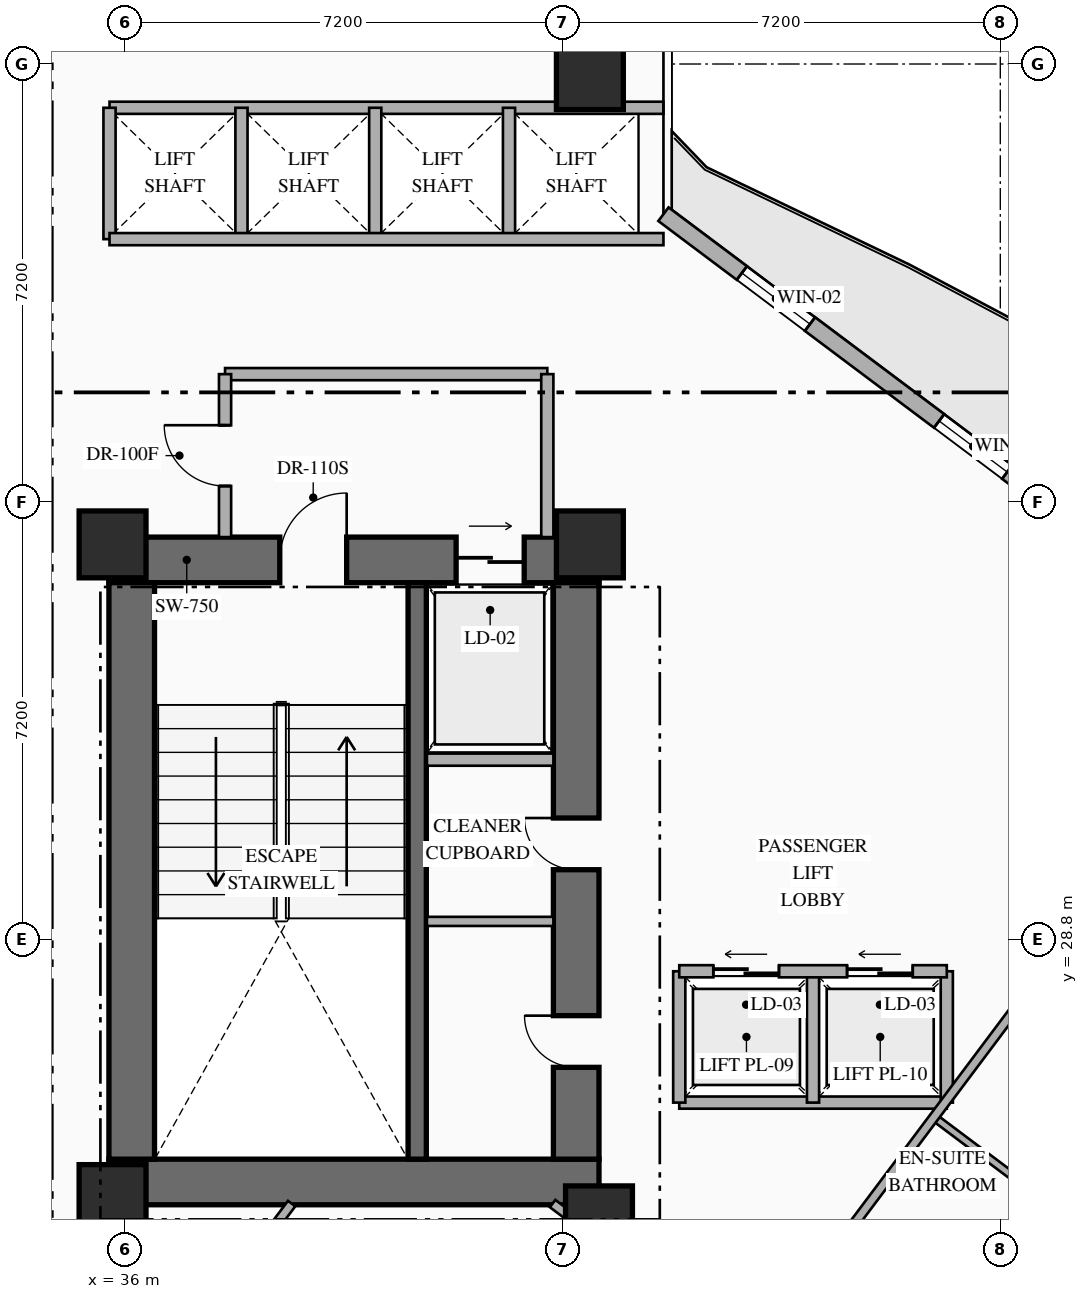
"""IFC4 building model, lengths in metres.
Left out: names, types, materials, properties, quantities, classifications, styles, units other than length and angle.
Written with IfcOpenShell. Run it as: python <this file> out.ifc"""

import sys

from ifc_helpers import new_model, si_unit, direction, frame, frame_2d, origin, origin_2d, place, context, subcontext, project, spatial, rectangle, extrude, element, fill, save


model = new_model("IFC4")
c1 = context("Model", 3, precision=1e-05, world=origin(), true_north=direction((0.0, 1.0)))
c2 = subcontext(c1, "Body", "Model", "MODEL_VIEW")
j1 = project(units=[si_unit("LENGTHUNIT", "METRE"), si_unit("PLANEANGLEUNIT", "RADIAN")], contexts=[c1])
p1 = place(None, origin())
s1 = spatial("IfcSite", under=j1, at=p1, CompositionType="ELEMENT")
p2 = place(p1, origin())
s2 = spatial("IfcBuilding", under=s1, at=p2, CompositionType="ELEMENT")
p3 = place(p2, frame((0.0, 0.0, 43.3)))
s3 = spatial("IfcBuildingStorey", under=s2, at=p3, CompositionType="ELEMENT", Elevation=43.3)
p4 = place(p3, frame((35.74, 24.815, 0.0), z_axis=(0.0, 0.0, 1.0), x_axis=(1.0, 0.0, 0.0)))
e1 = element("IfcWall", 1, at=p4, inside=s3, PredefinedType="SHEAR", context=c2, shape_type="SweptSolid", body=[
    extrude(rectangle(XDim=8.06, YDim=0.75, at=frame_2d((4.03, 0.0))), origin(), (0.0, 0.0, 1.0), 3.35),
])
p5 = place(p3, frame((35.74, 35.045, 0.0), z_axis=(0.0, 0.0, 1.0), x_axis=(1.0, 0.0, 0.0)))
e2 = element("IfcWall", 2, at=p5, inside=s3, PredefinedType="SHEAR", context=c2, shape_type="SweptSolid", body=[
    extrude(rectangle(XDim=8.06, YDim=0.75, at=frame_2d((4.03, 0.0))), origin(), (0.0, 0.0, 1.0), 3.35),
])
p6 = place(p5, frame((2.81, 0.0, 0.0)))
e3 = element("IfcOpeningElement", 3, at=p6, cuts=e2, PredefinedType="OPENING", context=c2, shape_type="SweptSolid", body=[
    extrude(rectangle(XDim=1.1, YDim=2.2, at=frame_2d((0.55, 1.1))), frame((0.0, 0.385, 0.0), z_axis=(0.0, -1.0, 0.0), x_axis=(1.0, 0.0, 0.0)), (0.0, 0.0, 1.0), 0.77),
])
p7 = place(p5, frame((5.71, 0.0, 0.0)))
e4 = element("IfcOpeningElement", 4, at=p7, cuts=e2, PredefinedType="OPENING", context=c2, shape_type="SweptSolid", body=[
    extrude(rectangle(XDim=1.12, YDim=2.15, at=frame_2d((0.56, 1.075))), frame((0.0, 0.385, 0.0), z_axis=(0.0, -1.0, 0.0), x_axis=(1.0, 0.0, 0.0)), (0.0, 0.0, 1.0), 0.77),
])
p8 = place(p3, frame((36.115, 25.19, 0.0), z_axis=(0.0, 0.0, 1.0), x_axis=(0.0, 1.0, 0.0)))
e5 = element("IfcWall", 5, at=p8, inside=s3, PredefinedType="SHEAR", context=c2, shape_type="SweptSolid", body=[
    extrude(rectangle(XDim=9.48, YDim=0.75, at=frame_2d((4.74, 0.0))), origin(), (0.0, 0.0, 1.0), 3.35),
])
p9 = place(p3, frame((43.425, 25.19, 0.0), z_axis=(0.0, 0.0, 1.0), x_axis=(0.0, 1.0, 0.0)))
e6 = element("IfcWall", 6, at=p9, inside=s3, PredefinedType="SHEAR", context=c2, shape_type="SweptSolid", body=[
    extrude(rectangle(XDim=9.48, YDim=0.75, at=frame_2d((4.74, 0.0))), origin(), (0.0, 0.0, 1.0), 3.35),
])
p10 = place(p9, frame((1.51, 0.0, 0.0)))
e7 = element("IfcOpeningElement", 7, at=p10, cuts=e6, PredefinedType="OPENING", context=c2, shape_type="SweptSolid", body=[
    extrude(rectangle(XDim=0.85, YDim=2.08, at=frame_2d((0.425, 1.04))), frame((0.0, 0.385, 0.0), z_axis=(0.0, -1.0, 0.0), x_axis=(1.0, 0.0, 0.0)), (0.0, 0.0, 1.0), 0.77),
])
p11 = place(p9, frame((4.76, 0.0, 0.0)))
e8 = element("IfcOpeningElement", 8, at=p11, cuts=e6, PredefinedType="OPENING", context=c2, shape_type="SweptSolid", body=[
    extrude(rectangle(XDim=0.85, YDim=2.08, at=frame_2d((0.425, 1.04))), frame((0.0, 0.385, 0.0), z_axis=(0.0, -1.0, 0.0), x_axis=(1.0, 0.0, 0.0)), (0.0, 0.0, 1.0), 0.77),
])
p12 = place(p3, frame((40.81, 25.19, 0.0), z_axis=(0.0, 0.0, 1.0), x_axis=(0.0, 1.0, 0.0)))
e9 = element("IfcWall", 9, at=p12, inside=s3, PredefinedType="SHEAR", context=c2, shape_type="SweptSolid", body=[
    extrude(rectangle(XDim=9.48, YDim=0.3, at=frame_2d((4.74, 0.0))), origin(), (0.0, 0.0, 1.0), 3.35),
])
for number, where, z_axis, x_axis in (
    (10, (35.8, 24.55, 0.0), (0.0, 0.0, 1.0), (1.0, 0.0, 0.0)),
    (11, (43.8, 24.2, 0.0), (0.0, 0.0, 1.0), (1.0, 0.0, 0.0)),
    (12, (35.8, 35.3, 0.0), (0.0, 0.0, 1.0), (1.0, 0.0, 0.0)),
    (13, (43.65, 35.3, 0.0), (0.0, 0.0, 1.0), (1.0, 0.0, 0.0)),
    (14, (43.65, 43.0, 0.0), (0.0, 0.0, 1.0), (1.0, 0.0, 0.0)),
):
    element("IfcColumn", number, at=place(p3, frame(where, z_axis=z_axis, x_axis=x_axis)), inside=s3, PredefinedType="COLUMN", context=c2, shape_type="SweptSolid", body=[
        extrude(rectangle(XDim=1.1, YDim=1.1, at=origin_2d()), origin(), (0.0, 0.0, 1.0), 3.35),
    ])
p13 = place(p3, frame((44.86, 40.73, 0.0), z_axis=(0.0, 0.0, 1.0), x_axis=(0.800006902154, -0.599990797017, 0.0)))
e15 = element("IfcWall", 15, at=p13, inside=s3, PredefinedType="STANDARD", context=c2, shape_type="SweptSolid", body=[
    extrude(rectangle(XDim=29.712, YDim=0.28, at=frame_2d((14.856, 0.0))), origin(), (0.0, 0.0, 1.0), 3.13),
])
p14 = place(p13, frame((14.249, 0.0, 0.0)))
e16 = element("IfcOpeningElement", 16, at=p14, cuts=e15, PredefinedType="OPENING", context=c2, shape_type="SweptSolid", body=[
    extrude(rectangle(XDim=1.1, YDim=2.2, at=frame_2d((0.55, 1.1))), frame((0.0, 0.15, 0.0), z_axis=(0.0, -1.0, 0.0), x_axis=(1.0, 0.0, 0.0)), (0.0, 0.0, 1.0), 0.3),
])
p15 = place(p13, frame((1.612, 0.0, 0.85)))
e17 = element("IfcOpeningElement", 17, at=p15, cuts=e15, PredefinedType="OPENING", context=c2, shape_type="SweptSolid", body=[
    extrude(rectangle(XDim=1.4, YDim=1.8, at=frame_2d((0.7, 0.9))), frame((0.0, 0.15, 0.0), z_axis=(0.0, -1.0, 0.0), x_axis=(1.0, 0.0, 0.0)), (0.0, 0.0, 1.0), 0.3),
])
p16 = place(p13, frame((5.667, 0.0, 0.85)))
e18 = element("IfcOpeningElement", 18, at=p16, cuts=e15, PredefinedType="OPENING", context=c2, shape_type="SweptSolid", body=[
    extrude(rectangle(XDim=1.4, YDim=1.8, at=frame_2d((0.7, 0.9))), frame((0.0, 0.15, 0.0), z_axis=(0.0, -1.0, 0.0), x_axis=(1.0, 0.0, 0.0)), (0.0, 0.0, 1.0), 0.3),
])
p17 = place(p13, frame((9.912, 0.0, 0.85)))
e19 = element("IfcOpeningElement", 19, at=p17, cuts=e15, PredefinedType="OPENING", context=c2, shape_type="SweptSolid", body=[
    extrude(rectangle(XDim=1.4, YDim=1.8, at=frame_2d((0.7, 0.9))), frame((0.0, 0.15, 0.0), z_axis=(0.0, -1.0, 0.0), x_axis=(1.0, 0.0, 0.0)), (0.0, 0.0, 1.0), 0.3),
])
p18 = place(p13, frame((19.528, 0.0, 0.85)))
e20 = element("IfcOpeningElement", 20, at=p18, cuts=e15, PredefinedType="OPENING", context=c2, shape_type="SweptSolid", body=[
    extrude(rectangle(XDim=1.4, YDim=1.8, at=frame_2d((0.7, 0.9))), frame((0.0, 0.15, 0.0), z_axis=(0.0, -1.0, 0.0), x_axis=(1.0, 0.0, 0.0)), (0.0, 0.0, 1.0), 0.3),
])
p19 = place(p13, frame((23.451, 0.0, 0.85)))
e21 = element("IfcOpeningElement", 21, at=p19, cuts=e15, PredefinedType="OPENING", context=c2, shape_type="SweptSolid", body=[
    extrude(rectangle(XDim=1.4, YDim=1.8, at=frame_2d((0.7, 0.9))), frame((0.0, 0.15, 0.0), z_axis=(0.0, -1.0, 0.0), x_axis=(1.0, 0.0, 0.0)), (0.0, 0.0, 1.0), 0.3),
])
p20 = place(p13, frame((27.852, 0.0, 0.85)))
e22 = element("IfcOpeningElement", 22, at=p20, cuts=e15, PredefinedType="OPENING", context=c2, shape_type="SweptSolid", body=[
    extrude(rectangle(XDim=1.4, YDim=1.8, at=frame_2d((0.7, 0.9))), frame((0.0, 0.15, 0.0), z_axis=(0.0, -1.0, 0.0), x_axis=(1.0, 0.0, 0.0)), (0.0, 0.0, 1.0), 0.3),
])
p21 = place(p3, frame((40.97, 31.76, 0.0), z_axis=(0.0, 0.0, 1.0), x_axis=(1.0, 0.0, 0.0)))
e23 = element("IfcWall", 23, at=p21, inside=s3, PredefinedType="STANDARD", context=c2, shape_type="SweptSolid", body=[
    extrude(rectangle(XDim=2.08, YDim=0.2, at=frame_2d((1.04, 0.0))), origin(), (0.0, 0.0, 1.0), 3.13),
])
p22 = place(p3, frame((40.97, 29.1, 0.0), z_axis=(0.0, 0.0, 1.0), x_axis=(1.0, 0.0, 0.0)))
e24 = element("IfcWall", 24, at=p22, inside=s3, PredefinedType="PARTITIONING", context=c2, shape_type="SweptSolid", body=[
    extrude(rectangle(XDim=2.08, YDim=0.15, at=frame_2d((1.04, 0.0))), origin(), (0.0, 0.0, 1.0), 3.13),
])
p23 = place(p3, frame((37.65, 38.1, 0.0), z_axis=(0.0, 0.0, 1.0), x_axis=(1.0, 0.0, 0.0)))
e25 = element("IfcWall", 25, at=p23, inside=s3, PredefinedType="STANDARD", context=c2, shape_type="SweptSolid", body=[
    extrude(rectangle(XDim=5.3, YDim=0.2, at=frame_2d((2.65, 0.0))), origin(), (0.0, 0.0, 1.0), 3.13),
])
p24 = place(p3, frame((42.95, 35.42, 0.0), z_axis=(0.0, 0.0, 1.0), x_axis=(0.0, 1.0, 0.0)))
e26 = element("IfcWall", 26, at=p24, inside=s3, PredefinedType="STANDARD", context=c2, shape_type="SweptSolid", body=[
    extrude(rectangle(XDim=2.68, YDim=0.2, at=frame_2d((1.34, 0.0))), origin(), (0.0, 0.0, 1.0), 3.13),
])
p25 = place(p3, frame((37.65, 35.42, 0.0), z_axis=(0.0, 0.0, 1.0), x_axis=(0.0, 1.0, 0.0)))
e27 = element("IfcWall", 27, at=p25, inside=s3, PredefinedType="STANDARD", context=c2, shape_type="SweptSolid", body=[
    extrude(rectangle(XDim=2.68, YDim=0.2, at=frame_2d((1.34, 0.0))), origin(), (0.0, 0.0, 1.0), 3.13),
])
p26 = place(p25, frame((0.84, 0.0, 0.0)))
e28 = element("IfcOpeningElement", 28, at=p26, cuts=e27, PredefinedType="OPENING", context=c2, shape_type="SweptSolid", body=[
    extrude(rectangle(XDim=1.0, YDim=2.2, at=frame_2d((0.5, 1.1))), frame((0.0, 0.11, 0.0), z_axis=(0.0, -1.0, 0.0), x_axis=(1.0, 0.0, 0.0)), (0.0, 0.0, 1.0), 0.22),
])
p27 = place(p3, frame((35.75, 42.48, 0.0), z_axis=(0.0, 0.0, 1.0), x_axis=(1.0, 0.0, 0.0)))
e29 = element("IfcWall", 29, at=p27, inside=s3, PredefinedType="STANDARD", context=c2, shape_type="SweptSolid", body=[
    extrude(rectangle(XDim=9.11, YDim=0.2, at=frame_2d((4.555, 0.0))), origin(), (0.0, 0.0, 1.0), 3.13),
])
for number, where, z_axis, x_axis in (
    (30, (35.75, 40.32, 0.0), (0.0, 0.0, 1.0), (0.0, 1.0, 0.0)),
    (31, (37.92, 40.32, 0.0), (0.0, 0.0, 1.0), (0.0, 1.0, 0.0)),
    (32, (40.12, 40.32, 0.0), (0.0, 0.0, 1.0), (0.0, 1.0, 0.0)),
    (33, (42.32, 40.32, 0.0), (0.0, 0.0, 1.0), (0.0, 1.0, 0.0)),
):
    element("IfcWall", number, at=place(p3, frame(where, z_axis=z_axis, x_axis=x_axis)), inside=s3, PredefinedType="STANDARD", context=c2, shape_type="SweptSolid", body=[
        extrude(rectangle(XDim=2.16, YDim=0.2, at=frame_2d((1.08, 0.0))), origin(), (0.0, 0.0, 1.0), 3.13),
    ])
p28 = place(p3, frame((35.75, 40.32, 0.0), z_axis=(0.0, 0.0, 1.0), x_axis=(1.0, 0.0, 0.0)))
e34 = element("IfcWall", 34, at=p28, inside=s3, PredefinedType="STANDARD", context=c2, shape_type="SweptSolid", body=[
    extrude(rectangle(XDim=9.11, YDim=0.2, at=frame_2d((4.555, 0.0))), origin(), (0.0, 0.0, 1.0), 3.13),
])
p29 = place(p3, frame((45.12, 26.12, 0.0), z_axis=(0.0, 0.0, 1.0), x_axis=(1.0, 0.0, 0.0)))
e35 = element("IfcWall", 35, at=p29, inside=s3, PredefinedType="STANDARD", context=c2, shape_type="SweptSolid", body=[
    extrude(rectangle(XDim=4.4, YDim=0.2, at=frame_2d((2.2, 0.0))), origin(), (0.0, 0.0, 1.0), 3.13),
])
for number, where, z_axis, x_axis in (
    (36, (45.12, 26.12, 0.0), (0.0, 0.0, 1.0), (0.0, 1.0, 0.0)),
    (37, (49.52, 26.12, 0.0), (0.0, 0.0, 1.0), (0.0, 1.0, 0.0)),
    (38, (47.32, 26.12, 0.0), (0.0, 0.0, 1.0), (0.0, 1.0, 0.0)),
):
    element("IfcWall", number, at=place(p3, frame(where, z_axis=z_axis, x_axis=x_axis)), inside=s3, PredefinedType="STANDARD", context=c2, shape_type="SweptSolid", body=[
        extrude(rectangle(XDim=2.16, YDim=0.2, at=frame_2d((1.08, 0.0))), origin(), (0.0, 0.0, 1.0), 3.13),
    ])
p30 = place(p3, frame((45.12, 28.28, 0.0), z_axis=(0.0, 0.0, 1.0), x_axis=(1.0, 0.0, 0.0)))
e39 = element("IfcWall", 39, at=p30, inside=s3, PredefinedType="STANDARD", context=c2, shape_type="SweptSolid", body=[
    extrude(rectangle(XDim=4.4, YDim=0.2, at=frame_2d((2.2, 0.0))), origin(), (0.0, 0.0, 1.0), 3.13),
])
p31 = place(p30, frame((0.56, 0.0, 0.0)))
e40 = element("IfcOpeningElement", 40, at=p31, cuts=e39, PredefinedType="OPENING", context=c2, shape_type="SweptSolid", body=[
    extrude(rectangle(XDim=1.08, YDim=2.15, at=frame_2d((0.54, 1.075))), frame((0.0, 0.11, 0.0), z_axis=(0.0, -1.0, 0.0), x_axis=(1.0, 0.0, 0.0)), (0.0, 0.0, 1.0), 0.22),
])
p32 = place(p30, frame((2.76, 0.0, 0.0)))
e41 = element("IfcOpeningElement", 41, at=p32, cuts=e39, PredefinedType="OPENING", context=c2, shape_type="SweptSolid", body=[
    extrude(rectangle(XDim=1.08, YDim=2.15, at=frame_2d((0.54, 1.075))), frame((0.0, 0.11, 0.0), z_axis=(0.0, -1.0, 0.0), x_axis=(1.0, 0.0, 0.0)), (0.0, 0.0, 1.0), 0.22),
])
p33 = place(p3, frame((43.037, 24.46, 0.0), z_axis=(0.0, 0.0, 1.0), x_axis=(0.799971872363, -0.600037501685, 0.0)))
e42 = element("IfcWall", 42, at=p33, inside=s3, PredefinedType="PARTITIONING", context=c2, shape_type="SweptSolid", body=[
    extrude(rectangle(XDim=4.167, YDim=0.15, at=frame_2d((2.083, 0.0))), origin(), (0.0, 0.0, 1.0), 2.425),
])
p34 = place(p33, frame((2.468, 0.0, 0.0)))
e43 = element("IfcOpeningElement", 43, at=p34, cuts=e42, PredefinedType="OPENING", context=c2, shape_type="SweptSolid", body=[
    extrude(rectangle(XDim=0.95, YDim=2.15, at=frame_2d((0.475, 1.075))), frame((0.0, 0.085, 0.0), z_axis=(0.0, -1.0, 0.0), x_axis=(1.0, 0.0, 0.0)), (0.0, 0.0, 1.0), 0.17),
])
p35 = place(p3, frame((33.384, 17.312, 0.0), z_axis=(0.0, 0.0, 1.0), x_axis=(0.600008743659, 0.799993442181, 0.0)))
e44 = element("IfcWall", 44, at=p35, inside=s3, PredefinedType="PARTITIONING", context=c2, shape_type="SweptSolid", body=[
    extrude(rectangle(XDim=8.935, YDim=0.15, at=frame_2d((4.468, 0.0))), origin(), (0.0, 0.0, 1.0), 3.13),
])
p36 = place(p3, frame((49.59, 22.67, 0.0), z_axis=(0.0, 0.0, 1.0), x_axis=(0.599951172744, 0.800036618114, 0.0)))
e45 = element("IfcWall", 45, at=p36, inside=s3, PredefinedType="PARTITIONING", context=c2, shape_type="SweptSolid", body=[
    extrude(rectangle(XDim=2.4, YDim=0.12, at=frame_2d((1.2, 0.0))), origin(), (0.0, 0.0, 1.0), 3.13),
])
p37 = place(p36, frame((0.8, 0.0, 0.0)))
e46 = element("IfcOpeningElement", 46, at=p37, cuts=e45, PredefinedType="OPENING", context=c2, shape_type="SweptSolid", body=[
    extrude(rectangle(XDim=0.8, YDim=2.06, at=frame_2d((0.4, 1.03))), frame((0.0, 0.07, 0.0), z_axis=(0.0, -1.0, 0.0), x_axis=(1.0, 0.0, 0.0)), (0.0, 0.0, 1.0), 0.14),
])
p38 = place(p3, frame((49.31, 25.88, 0.0), z_axis=(0.0, 0.0, 1.0), x_axis=(0.800040880289, -0.59994548908, 0.0)))
e47 = element("IfcWall", 47, at=p38, inside=s3, PredefinedType="PARTITIONING", context=c2, shape_type="SweptSolid", body=[
    extrude(rectangle(XDim=2.15, YDim=0.12, at=frame_2d((1.075, 0.0))), origin(), (0.0, 0.0, 1.0), 3.13),
])
p39 = place(p3, frame((47.87, 23.96, 0.0), z_axis=(0.0, 0.0, 1.0), x_axis=(0.599996617946, 0.80000253653, 0.0)))
e48 = element("IfcWall", 48, at=p39, inside=s3, PredefinedType="PARTITIONING", context=c2, shape_type="SweptSolid", body=[
    extrude(rectangle(XDim=11.55, YDim=0.15, at=frame_2d((5.775, 0.0))), origin(), (0.0, 0.0, 1.0), 3.13),
])
p40 = place(p15, origin())
e49 = element("IfcWindow", 49, at=p40, inside=s3, PartitioningType="SINGLE_PANEL", PredefinedType="WINDOW", context=c2, shape_type="SweptSolid", body=[
    extrude(rectangle(XDim=1.4, YDim=1.8, at=frame_2d((0.7, 0.9))), frame((0.0, 0.03, 0.0), z_axis=(0.0, -1.0, 0.0), x_axis=(1.0, 0.0, 0.0)), (0.0, 0.0, 1.0), 0.06),
])
fill(e17, e49)
p41 = place(p16, origin())
e50 = element("IfcWindow", 50, at=p41, inside=s3, PartitioningType="SINGLE_PANEL", PredefinedType="WINDOW", context=c2, shape_type="SweptSolid", body=[
    extrude(rectangle(XDim=1.4, YDim=1.8, at=frame_2d((0.7, 0.9))), frame((0.0, 0.03, 0.0), z_axis=(0.0, -1.0, 0.0), x_axis=(1.0, 0.0, 0.0)), (0.0, 0.0, 1.0), 0.06),
])
fill(e18, e50)
p42 = place(p6, origin())
e51 = element("IfcDoor", 51, at=p42, inside=s3, OperationType="SINGLE_SWING_RIGHT", PredefinedType="DOOR", context=c2, shape_type="SweptSolid", body=[
    extrude(rectangle(XDim=1.1, YDim=2.2, at=frame_2d((0.55, 1.1))), frame((0.0, 0.025, 0.0), z_axis=(0.0, -1.0, 0.0), x_axis=(1.0, 0.0, 0.0)), (0.0, 0.0, 1.0), 0.05),
])
fill(e3, e51)
p43 = place(p7, origin())
e52 = element("IfcDoor", 52, at=p43, inside=s3, OperationType="SLIDING_TO_RIGHT", PredefinedType="USERDEFINED", context=c2, shape_type="SweptSolid", body=[
    extrude(rectangle(XDim=1.12, YDim=2.15, at=frame_2d((0.56, 1.075))), frame((0.0, 0.025, 0.0), z_axis=(0.0, -1.0, 0.0), x_axis=(1.0, 0.0, 0.0)), (0.0, 0.0, 1.0), 0.05),
])
fill(e4, e52)
p44 = place(p10, origin())
e53 = element("IfcDoor", 53, at=p44, inside=s3, OperationType="SINGLE_SWING_RIGHT", PredefinedType="DOOR", context=c2, shape_type="SweptSolid", body=[
    extrude(rectangle(XDim=0.85, YDim=2.08, at=frame_2d((0.425, 1.04))), frame((0.0, 0.025, 0.0), z_axis=(0.0, -1.0, 0.0), x_axis=(1.0, 0.0, 0.0)), (0.0, 0.0, 1.0), 0.05),
])
fill(e7, e53)
p45 = place(p11, origin())
e54 = element("IfcDoor", 54, at=p45, inside=s3, OperationType="SINGLE_SWING_RIGHT", PredefinedType="DOOR", context=c2, shape_type="SweptSolid", body=[
    extrude(rectangle(XDim=0.85, YDim=2.08, at=frame_2d((0.425, 1.04))), frame((0.0, 0.025, 0.0), z_axis=(0.0, -1.0, 0.0), x_axis=(1.0, 0.0, 0.0)), (0.0, 0.0, 1.0), 0.05),
])
fill(e8, e54)
p46 = place(p26, origin())
e55 = element("IfcDoor", 55, at=p46, inside=s3, OperationType="SINGLE_SWING_RIGHT", PredefinedType="DOOR", context=c2, shape_type="SweptSolid", body=[
    extrude(rectangle(XDim=1.0, YDim=2.2, at=frame_2d((0.5, 1.1))), frame((0.0, 0.025, 0.0), z_axis=(0.0, -1.0, 0.0), x_axis=(1.0, 0.0, 0.0)), (0.0, 0.0, 1.0), 0.05),
])
fill(e28, e55)
p47 = place(p31, origin())
e56 = element("IfcDoor", 56, at=p47, inside=s3, OperationType="SLIDING_TO_LEFT", PredefinedType="USERDEFINED", context=c2, shape_type="SweptSolid", body=[
    extrude(rectangle(XDim=1.08, YDim=2.15, at=frame_2d((0.54, 1.075))), frame((0.0, 0.025, 0.0), z_axis=(0.0, -1.0, 0.0), x_axis=(1.0, 0.0, 0.0)), (0.0, 0.0, 1.0), 0.05),
])
fill(e40, e56)
p48 = place(p32, origin())
e57 = element("IfcDoor", 57, at=p48, inside=s3, OperationType="SLIDING_TO_LEFT", PredefinedType="USERDEFINED", context=c2, shape_type="SweptSolid", body=[
    extrude(rectangle(XDim=1.08, YDim=2.15, at=frame_2d((0.54, 1.075))), frame((0.0, 0.025, 0.0), z_axis=(0.0, -1.0, 0.0), x_axis=(1.0, 0.0, 0.0)), (0.0, 0.0, 1.0), 0.05),
])
fill(e41, e57)
save(model, sys.argv[1])
